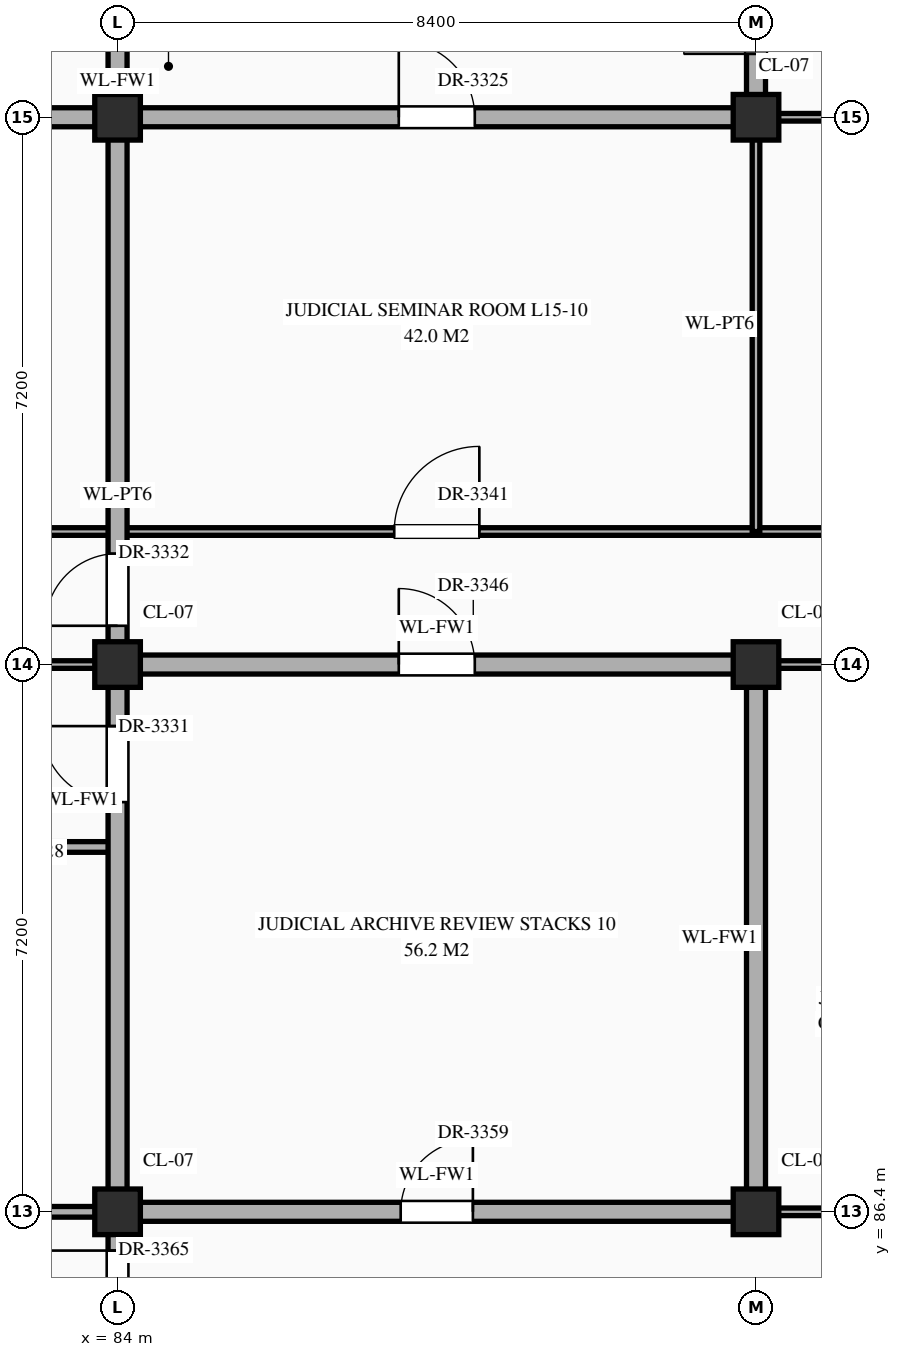
"""IFC4 building model, lengths in metres.
Left out: names, types, materials, properties, quantities, classifications, styles, units other than length and angle.
Written with IfcOpenShell. Run it as: python <this file> out.ifc"""

import sys

from ifc_helpers import new_model, si_unit, direction, frame, frame_2d, origin, origin_2d, place, context, subcontext, project, spatial, rectangle, extrude, element, fill, save


model = new_model("IFC4")
c1 = context("Model", 3, precision=1e-05, world=origin(), true_north=direction((0.0, 1.0)))
c2 = subcontext(c1, "Body", "Model", "MODEL_VIEW")
j1 = project(units=[si_unit("LENGTHUNIT", "METRE"), si_unit("PLANEANGLEUNIT", "RADIAN")], contexts=[c1])
p1 = place(None, origin())
s1 = spatial("IfcSite", under=j1, at=p1, CompositionType="ELEMENT")
p2 = place(p1, origin())
s2 = spatial("IfcBuilding", under=s1, at=p2, CompositionType="ELEMENT")
p3 = place(p2, frame((0.0, 0.0, 64.5)))
s3 = spatial("IfcBuildingStorey", under=s2, at=p3, CompositionType="ELEMENT", Elevation=64.5)
for number, where, z_axis, x_axis in (
    (1, (84.0, 86.4, 0.0), (0.0, 0.0, 1.0), (1.0, 0.0, 0.0)),
    (2, (84.0, 93.6, 0.0), (0.0, 0.0, 1.0), (1.0, 0.0, 0.0)),
    (3, (84.0, 100.8, 0.0), (0.0, 0.0, 1.0), (1.0, 0.0, 0.0)),
    (4, (92.4, 86.4, 0.0), (0.0, 0.0, 1.0), (1.0, 0.0, 0.0)),
    (5, (92.4, 93.6, 0.0), (0.0, 0.0, 1.0), (1.0, 0.0, 0.0)),
    (6, (92.4, 100.8, 0.0), (0.0, 0.0, 1.0), (1.0, 0.0, 0.0)),
):
    element("IfcColumn", number, at=place(p3, frame(where, z_axis=z_axis, x_axis=x_axis)), inside=s3, PredefinedType="COLUMN", context=c2, shape_type="SweptSolid", body=[
        extrude(rectangle(XDim=0.6, YDim=0.6, at=origin_2d()), origin(), (0.0, 0.0, 1.0), 4.2),
    ])
p4 = place(p3, frame((75.6, 86.4, 0.0), z_axis=(0.0, 0.0, 1.0), x_axis=(1.0, 0.0, 0.0)))
e7 = element("IfcWall", 7, at=p4, inside=s3, PredefinedType="STANDARD", context=c2, shape_type="SweptSolid", body=[
    extrude(rectangle(XDim=8.4, YDim=0.14, at=frame_2d((4.2, 0.0))), origin(), (0.0, 0.0, 1.0), 3.0),
])
p5 = place(p3, frame((84.0, 86.4, 0.0), z_axis=(0.0, 0.0, 1.0), x_axis=(1.0, 0.0, 0.0)))
e8 = element("IfcWall", 8, at=p5, inside=s3, PredefinedType="STANDARD", context=c2, shape_type="SweptSolid", body=[
    extrude(rectangle(XDim=8.4, YDim=0.25, at=frame_2d((4.2, 0.0))), origin(), (0.0, 0.0, 1.0), 3.0),
])
p6 = place(p5, frame((3.725, 0.0, 0.0)))
e9 = element("IfcOpeningElement", 9, at=p6, cuts=e8, PredefinedType="OPENING", context=c2, shape_type="SweptSolid", body=[
    extrude(rectangle(XDim=0.95, YDim=2.15, at=frame_2d((0.475, 1.075))), frame((0.0, 0.137, 0.0), z_axis=(0.0, -1.0, 0.0), x_axis=(1.0, 0.0, 0.0)), (0.0, 0.0, 1.0), 0.274),
])
p7 = place(p3, frame((92.4, 86.4, 0.0), z_axis=(0.0, 0.0, 1.0), x_axis=(1.0, 0.0, 0.0)))
e10 = element("IfcWall", 10, at=p7, inside=s3, PredefinedType="STANDARD", context=c2, shape_type="SweptSolid", body=[
    extrude(rectangle(XDim=5.6, YDim=0.1, at=frame_2d((2.8, 0.0))), origin(), (0.0, 0.0, 1.0), 3.0),
])
p8 = place(p7, frame((0.89, 0.0, 0.0)))
e11 = element("IfcOpeningElement", 11, at=p8, cuts=e10, PredefinedType="OPENING", context=c2, shape_type="SweptSolid", body=[
    extrude(rectangle(XDim=1.24, YDim=2.3, at=frame_2d((0.62, 1.15))), frame((0.0, 0.062, 0.0), z_axis=(0.0, -1.0, 0.0), x_axis=(1.0, 0.0, 0.0)), (0.0, 0.0, 1.0), 0.124),
])
p9 = place(p7, frame((3.73, 0.0, 0.0)))
e12 = element("IfcOpeningElement", 12, at=p9, cuts=e10, PredefinedType="OPENING", context=c2, shape_type="SweptSolid", body=[
    extrude(rectangle(XDim=0.94, YDim=2.3, at=frame_2d((0.47, 1.15))), frame((0.0, 0.062, 0.0), z_axis=(0.0, -1.0, 0.0), x_axis=(1.0, 0.0, 0.0)), (0.0, 0.0, 1.0), 0.124),
])
p10 = place(p3, frame((75.6, 91.2, 0.0), z_axis=(0.0, 0.0, 1.0), x_axis=(1.0, 0.0, 0.0)))
e13 = element("IfcWall", 13, at=p10, inside=s3, PredefinedType="STANDARD", context=c2, shape_type="SweptSolid", body=[
    extrude(rectangle(XDim=8.4, YDim=0.14, at=frame_2d((4.2, 0.0))), origin(), (0.0, 0.0, 1.0), 3.95),
])
p11 = place(p10, frame((0.65, 0.0, 0.0)))
e14 = element("IfcOpeningElement", 14, at=p11, cuts=e13, PredefinedType="OPENING", context=c2, shape_type="SweptSolid", body=[
    extrude(rectangle(XDim=0.9, YDim=2.15, at=frame_2d((0.45, 1.075))), frame((0.0, 0.082, 0.0), z_axis=(0.0, -1.0, 0.0), x_axis=(1.0, 0.0, 0.0)), (0.0, 0.0, 1.0), 0.164),
])
p12 = place(p10, frame((3.22, 0.0, 0.0)))
e15 = element("IfcOpeningElement", 15, at=p12, cuts=e13, PredefinedType="OPENING", context=c2, shape_type="SweptSolid", body=[
    extrude(rectangle(XDim=0.86, YDim=2.1, at=frame_2d((0.43, 1.05))), frame((0.0, 0.082, 0.0), z_axis=(0.0, -1.0, 0.0), x_axis=(1.0, 0.0, 0.0)), (0.0, 0.0, 1.0), 0.164),
])
p13 = place(p10, frame((6.32, 0.0, 0.0)))
e16 = element("IfcOpeningElement", 16, at=p13, cuts=e13, PredefinedType="OPENING", context=c2, shape_type="SweptSolid", body=[
    extrude(rectangle(XDim=0.86, YDim=2.1, at=frame_2d((0.43, 1.05))), frame((0.0, 0.082, 0.0), z_axis=(0.0, -1.0, 0.0), x_axis=(1.0, 0.0, 0.0)), (0.0, 0.0, 1.0), 0.164),
])
p14 = place(p3, frame((75.6, 93.6, 0.0), z_axis=(0.0, 0.0, 1.0), x_axis=(1.0, 0.0, 0.0)))
e17 = element("IfcWall", 17, at=p14, inside=s3, PredefinedType="STANDARD", context=c2, shape_type="SweptSolid", body=[
    extrude(rectangle(XDim=8.4, YDim=0.1, at=frame_2d((4.2, 0.0))), origin(), (0.0, 0.0, 1.0), 3.1),
])
p15 = place(p14, frame((3.425, 0.0, 0.0)))
e18 = element("IfcOpeningElement", 18, at=p15, cuts=e17, PredefinedType="OPENING", context=c2, shape_type="SweptSolid", body=[
    extrude(rectangle(XDim=1.55, YDim=2.35, at=frame_2d((0.775, 1.175))), frame((0.0, 0.062, 0.0), z_axis=(0.0, -1.0, 0.0), x_axis=(1.0, 0.0, 0.0)), (0.0, 0.0, 1.0), 0.124),
])
p16 = place(p3, frame((84.0, 93.6, 0.0), z_axis=(0.0, 0.0, 1.0), x_axis=(1.0, 0.0, 0.0)))
e19 = element("IfcWall", 19, at=p16, inside=s3, PredefinedType="STANDARD", context=c2, shape_type="SweptSolid", body=[
    extrude(rectangle(XDim=8.4, YDim=0.25, at=frame_2d((4.2, 0.0))), origin(), (0.0, 0.0, 1.0), 3.1),
])
p17 = place(p16, frame((3.7, 0.0, 0.0)))
e20 = element("IfcOpeningElement", 20, at=p17, cuts=e19, PredefinedType="OPENING", context=c2, shape_type="SweptSolid", body=[
    extrude(rectangle(XDim=1.0, YDim=2.2, at=frame_2d((0.5, 1.1))), frame((0.0, 0.137, 0.0), z_axis=(0.0, -1.0, 0.0), x_axis=(1.0, 0.0, 0.0)), (0.0, 0.0, 1.0), 0.274),
])
p18 = place(p3, frame((92.4, 93.6, 0.0), z_axis=(0.0, 0.0, 1.0), x_axis=(1.0, 0.0, 0.0)))
e21 = element("IfcWall", 21, at=p18, inside=s3, PredefinedType="STANDARD", context=c2, shape_type="SweptSolid", body=[
    extrude(rectangle(XDim=5.6, YDim=0.1, at=frame_2d((2.8, 0.0))), origin(), (0.0, 0.0, 1.0), 3.1),
])
p19 = place(p18, frame((1.02, 0.0, 0.0)))
e22 = element("IfcOpeningElement", 22, at=p19, cuts=e21, PredefinedType="OPENING", context=c2, shape_type="SweptSolid", body=[
    extrude(rectangle(XDim=0.98, YDim=2.35, at=frame_2d((0.49, 1.175))), frame((0.0, 0.062, 0.0), z_axis=(0.0, -1.0, 0.0), x_axis=(1.0, 0.0, 0.0)), (0.0, 0.0, 1.0), 0.124),
])
p20 = place(p18, frame((3.69, 0.0, 0.0)))
e23 = element("IfcOpeningElement", 23, at=p20, cuts=e21, PredefinedType="OPENING", context=c2, shape_type="SweptSolid", body=[
    extrude(rectangle(XDim=1.02, YDim=2.4, at=frame_2d((0.51, 1.2))), frame((0.0, 0.062, 0.0), z_axis=(0.0, -1.0, 0.0), x_axis=(1.0, 0.0, 0.0)), (0.0, 0.0, 1.0), 0.124),
])
p21 = place(p3, frame((58.84, 95.35, 0.0), z_axis=(0.0, 0.0, 1.0), x_axis=(1.0, 0.0, 0.0)))
e24 = element("IfcWall", 24, at=p21, inside=s3, PredefinedType="STANDARD", context=c2, shape_type="SweptSolid", body=[
    extrude(rectangle(XDim=50.32, YDim=0.1, at=frame_2d((25.16, 0.0))), origin(), (0.0, 0.0, 1.0), 3.95),
])
p22 = place(p21, frame((3.61, 0.0, 0.0)))
e25 = element("IfcOpeningElement", 25, at=p22, cuts=e24, PredefinedType="OPENING", context=c2, shape_type="SweptSolid", body=[
    extrude(rectangle(XDim=1.14, YDim=2.4, at=frame_2d((0.57, 1.2))), frame((0.0, 0.062, 0.0), z_axis=(0.0, -1.0, 0.0), x_axis=(1.0, 0.0, 0.0)), (0.0, 0.0, 1.0), 0.124),
])
p23 = place(p21, frame((9.61, 0.0, 0.0)))
e26 = element("IfcOpeningElement", 26, at=p23, cuts=e24, PredefinedType="OPENING", context=c2, shape_type="SweptSolid", body=[
    extrude(rectangle(XDim=0.9, YDim=2.15, at=frame_2d((0.45, 1.075))), frame((0.0, 0.062, 0.0), z_axis=(0.0, -1.0, 0.0), x_axis=(1.0, 0.0, 0.0)), (0.0, 0.0, 1.0), 0.124),
])
p24 = place(p21, frame((12.53, 0.0, 0.0)))
e27 = element("IfcOpeningElement", 27, at=p24, cuts=e24, PredefinedType="OPENING", context=c2, shape_type="SweptSolid", body=[
    extrude(rectangle(XDim=0.86, YDim=2.1, at=frame_2d((0.43, 1.05))), frame((0.0, 0.062, 0.0), z_axis=(0.0, -1.0, 0.0), x_axis=(1.0, 0.0, 0.0)), (0.0, 0.0, 1.0), 0.124),
])
p25 = place(p21, frame((15.0, 0.0, 0.0)))
e28 = element("IfcOpeningElement", 28, at=p25, cuts=e24, PredefinedType="OPENING", context=c2, shape_type="SweptSolid", body=[
    extrude(rectangle(XDim=0.92, YDim=2.15, at=frame_2d((0.46, 1.075))), frame((0.0, 0.062, 0.0), z_axis=(0.0, -1.0, 0.0), x_axis=(1.0, 0.0, 0.0)), (0.0, 0.0, 1.0), 0.124),
])
p26 = place(p21, frame((20.48, 0.0, 0.0)))
e29 = element("IfcOpeningElement", 29, at=p26, cuts=e24, PredefinedType="OPENING", context=c2, shape_type="SweptSolid", body=[
    extrude(rectangle(XDim=0.96, YDim=2.2, at=frame_2d((0.48, 1.1))), frame((0.0, 0.062, 0.0), z_axis=(0.0, -1.0, 0.0), x_axis=(1.0, 0.0, 0.0)), (0.0, 0.0, 1.0), 0.124),
])
p27 = place(p21, frame((28.8, 0.0, 0.0)))
e30 = element("IfcOpeningElement", 30, at=p27, cuts=e24, PredefinedType="OPENING", context=c2, shape_type="SweptSolid", body=[
    extrude(rectangle(XDim=1.12, YDim=2.25, at=frame_2d((0.56, 1.125))), frame((0.0, 0.062, 0.0), z_axis=(0.0, -1.0, 0.0), x_axis=(1.0, 0.0, 0.0)), (0.0, 0.0, 1.0), 0.124),
])
p28 = place(p21, frame((34.68, 0.0, 0.0)))
e31 = element("IfcOpeningElement", 31, at=p28, cuts=e24, PredefinedType="OPENING", context=c2, shape_type="SweptSolid", body=[
    extrude(rectangle(XDim=1.16, YDim=2.3, at=frame_2d((0.58, 1.15))), frame((0.0, 0.062, 0.0), z_axis=(0.0, -1.0, 0.0), x_axis=(1.0, 0.0, 0.0)), (0.0, 0.0, 1.0), 0.124),
])
p29 = place(p21, frame((37.56, 0.0, 0.0)))
e32 = element("IfcOpeningElement", 32, at=p29, cuts=e24, PredefinedType="OPENING", context=c2, shape_type="SweptSolid", body=[
    extrude(rectangle(XDim=1.2, YDim=2.35, at=frame_2d((0.6, 1.175))), frame((0.0, 0.062, 0.0), z_axis=(0.0, -1.0, 0.0), x_axis=(1.0, 0.0, 0.0)), (0.0, 0.0, 1.0), 0.124),
])
p30 = place(p21, frame((40.04, 0.0, 0.0)))
e33 = element("IfcOpeningElement", 33, at=p30, cuts=e24, PredefinedType="OPENING", context=c2, shape_type="SweptSolid", body=[
    extrude(rectangle(XDim=1.24, YDim=2.3, at=frame_2d((0.62, 1.15))), frame((0.0, 0.062, 0.0), z_axis=(0.0, -1.0, 0.0), x_axis=(1.0, 0.0, 0.0)), (0.0, 0.0, 1.0), 0.124),
])
p31 = place(p21, frame((45.5, 0.0, 0.0)))
e34 = element("IfcOpeningElement", 34, at=p31, cuts=e24, PredefinedType="OPENING", context=c2, shape_type="SweptSolid", body=[
    extrude(rectangle(XDim=1.28, YDim=2.35, at=frame_2d((0.64, 1.175))), frame((0.0, 0.062, 0.0), z_axis=(0.0, -1.0, 0.0), x_axis=(1.0, 0.0, 0.0)), (0.0, 0.0, 1.0), 0.124),
])
p32 = place(p3, frame((75.6, 100.8, 0.0), z_axis=(0.0, 0.0, 1.0), x_axis=(1.0, 0.0, 0.0)))
e35 = element("IfcWall", 35, at=p32, inside=s3, PredefinedType="STANDARD", context=c2, shape_type="SweptSolid", body=[
    extrude(rectangle(XDim=16.8, YDim=0.25, at=frame_2d((8.4, 0.0))), origin(), (0.0, 0.0, 1.0), 3.1),
])
p33 = place(p32, frame((3.65, 0.0, 0.0)))
e36 = element("IfcOpeningElement", 36, at=p33, cuts=e35, PredefinedType="OPENING", context=c2, shape_type="SweptSolid", body=[
    extrude(rectangle(XDim=1.1, YDim=2.2, at=frame_2d((0.55, 1.1))), frame((0.0, 0.137, 0.0), z_axis=(0.0, -1.0, 0.0), x_axis=(1.0, 0.0, 0.0)), (0.0, 0.0, 1.0), 0.274),
])
p34 = place(p32, frame((12.1, 0.0, 0.0)))
e37 = element("IfcOpeningElement", 37, at=p34, cuts=e35, PredefinedType="OPENING", context=c2, shape_type="SweptSolid", body=[
    extrude(rectangle(XDim=1.0, YDim=2.2, at=frame_2d((0.5, 1.1))), frame((0.0, 0.137, 0.0), z_axis=(0.0, -1.0, 0.0), x_axis=(1.0, 0.0, 0.0)), (0.0, 0.0, 1.0), 0.274),
])
p35 = place(p3, frame((92.4, 100.8, 0.0), z_axis=(0.0, 0.0, 1.0), x_axis=(1.0, 0.0, 0.0)))
e38 = element("IfcWall", 38, at=p35, inside=s3, PredefinedType="STANDARD", context=c2, shape_type="SweptSolid", body=[
    extrude(rectangle(XDim=3.4, YDim=0.1, at=frame_2d((1.7, 0.0))), origin(), (0.0, 0.0, 1.0), 3.1),
])
p36 = place(p35, frame((1.31, 0.0, 0.0)))
e39 = element("IfcOpeningElement", 39, at=p36, cuts=e38, PredefinedType="OPENING", context=c2, shape_type="SweptSolid", body=[
    extrude(rectangle(XDim=1.0, YDim=2.25, at=frame_2d((0.5, 1.125))), frame((0.0, 0.062, 0.0), z_axis=(0.0, -1.0, 0.0), x_axis=(1.0, 0.0, 0.0)), (0.0, 0.0, 1.0), 0.124),
])
p37 = place(p3, frame((84.0, 79.24, 0.0), z_axis=(0.0, 0.0, 1.0), x_axis=(0.0, 1.0, 0.0)))
e40 = element("IfcWall", 40, at=p37, inside=s3, PredefinedType="STANDARD", context=c2, shape_type="SweptSolid", body=[
    extrude(rectangle(XDim=25.16, YDim=0.25, at=frame_2d((12.58, 0.0))), origin(), (0.0, 0.0, 1.0), 3.1),
])
p38 = place(p37, frame((22.72, 0.0, 0.0)))
e41 = element("IfcOpeningElement", 41, at=p38, cuts=e40, PredefinedType="OPENING", context=c2, shape_type="SweptSolid", body=[
    extrude(rectangle(XDim=1.5, YDim=2.25, at=frame_2d((0.75, 1.125))), frame((0.0, 0.137, 0.0), z_axis=(0.0, -1.0, 0.0), x_axis=(1.0, 0.0, 0.0)), (0.0, 0.0, 1.0), 0.274),
])
p39 = place(p37, frame((12.55, 0.0, 0.0)))
e42 = element("IfcOpeningElement", 42, at=p39, cuts=e40, PredefinedType="OPENING", context=c2, shape_type="SweptSolid", body=[
    extrude(rectangle(XDim=1.0, YDim=2.2, at=frame_2d((0.5, 1.1))), frame((0.0, 0.137, 0.0), z_axis=(0.0, -1.0, 0.0), x_axis=(1.0, 0.0, 0.0)), (0.0, 0.0, 1.0), 0.274),
])
p40 = place(p37, frame((14.87, 0.0, 0.0)))
e43 = element("IfcOpeningElement", 43, at=p40, cuts=e40, PredefinedType="OPENING", context=c2, shape_type="SweptSolid", body=[
    extrude(rectangle(XDim=0.95, YDim=2.15, at=frame_2d((0.475, 1.075))), frame((0.0, 0.137, 0.0), z_axis=(0.0, -1.0, 0.0), x_axis=(1.0, 0.0, 0.0)), (0.0, 0.0, 1.0), 0.274),
])
p41 = place(p37, frame((5.7, 0.0, 0.0)))
e44 = element("IfcOpeningElement", 44, at=p41, cuts=e40, PredefinedType="OPENING", context=c2, shape_type="SweptSolid", body=[
    extrude(rectangle(XDim=0.95, YDim=2.15, at=frame_2d((0.475, 1.075))), frame((0.0, 0.137, 0.0), z_axis=(0.0, -1.0, 0.0), x_axis=(1.0, 0.0, 0.0)), (0.0, 0.0, 1.0), 0.274),
])
p42 = place(p3, frame((92.4, 86.4, 0.0), z_axis=(0.0, 0.0, 1.0), x_axis=(0.0, 1.0, 0.0)))
e45 = element("IfcWall", 45, at=p42, inside=s3, PredefinedType="STANDARD", context=c2, shape_type="SweptSolid", body=[
    extrude(rectangle(XDim=7.2, YDim=0.25, at=frame_2d((3.6, 0.0))), origin(), (0.0, 0.0, 1.0), 3.2),
])
p43 = place(p3, frame((92.4, 95.35, 0.0), z_axis=(0.0, 0.0, 1.0), x_axis=(0.0, 1.0, 0.0)))
e46 = element("IfcWall", 46, at=p43, inside=s3, PredefinedType="STANDARD", context=c2, shape_type="SweptSolid", body=[
    extrude(rectangle(XDim=5.45, YDim=0.1, at=frame_2d((2.725, 0.0))), origin(), (0.0, 0.0, 1.0), 3.2),
])
p44 = place(p3, frame((92.4, 100.8, 0.0), z_axis=(0.0, 0.0, 1.0), x_axis=(0.0, 1.0, 0.0)))
e47 = element("IfcWall", 47, at=p44, inside=s3, PredefinedType="STANDARD", context=c2, shape_type="SweptSolid", body=[
    extrude(rectangle(XDim=3.6, YDim=0.25, at=frame_2d((1.8, 0.0))), origin(), (0.0, 0.0, 1.0), 3.2),
])
p45 = place(p44, frame((0.835, 0.0, 0.0)))
e48 = element("IfcOpeningElement", 48, at=p45, cuts=e47, PredefinedType="OPENING", context=c2, shape_type="SweptSolid", body=[
    extrude(rectangle(XDim=0.95, YDim=2.15, at=frame_2d((0.475, 1.075))), frame((0.0, 0.137, 0.0), z_axis=(0.0, -1.0, 0.0), x_axis=(1.0, 0.0, 0.0)), (0.0, 0.0, 1.0), 0.274),
])
p46 = place(p45, origin())
e49 = element("IfcDoor", 49, at=p46, inside=s3, OperationType="SINGLE_SWING_LEFT", PredefinedType="DOOR", context=c2, shape_type="SweptSolid", body=[
    extrude(rectangle(XDim=0.95, YDim=2.15, at=frame_2d((0.475, 1.075))), frame((0.0, 0.025, 0.0), z_axis=(0.0, -1.0, 0.0), x_axis=(1.0, 0.0, 0.0)), (0.0, 0.0, 1.0), 0.05),
])
fill(e48, e49)
p47 = place(p34, origin())
e50 = element("IfcDoor", 50, at=p47, inside=s3, OperationType="SINGLE_SWING_LEFT", PredefinedType="DOOR", context=c2, shape_type="SweptSolid", body=[
    extrude(rectangle(XDim=1.0, YDim=2.2, at=frame_2d((0.5, 1.1))), frame((0.0, 0.025, 0.0), z_axis=(0.0, -1.0, 0.0), x_axis=(1.0, 0.0, 0.0)), (0.0, 0.0, 1.0), 0.05),
])
fill(e37, e50)
p48 = place(p39, origin())
e51 = element("IfcDoor", 51, at=p48, inside=s3, OperationType="SINGLE_SWING_RIGHT", PredefinedType="DOOR", context=c2, shape_type="SweptSolid", body=[
    extrude(rectangle(XDim=1.0, YDim=2.2, at=frame_2d((0.5, 1.1))), frame((0.0, 0.025, 0.0), z_axis=(0.0, -1.0, 0.0), x_axis=(1.0, 0.0, 0.0)), (0.0, 0.0, 1.0), 0.05),
])
fill(e42, e51)
p49 = place(p40, origin())
e52 = element("IfcDoor", 52, at=p49, inside=s3, OperationType="SINGLE_SWING_LEFT", PredefinedType="DOOR", context=c2, shape_type="SweptSolid", body=[
    extrude(rectangle(XDim=0.95, YDim=2.15, at=frame_2d((0.475, 1.075))), frame((0.0, 0.025, 0.0), z_axis=(0.0, -1.0, 0.0), x_axis=(1.0, 0.0, 0.0)), (0.0, 0.0, 1.0), 0.05),
])
fill(e43, e52)
p50 = place(p27, origin())
e53 = element("IfcDoor", 53, at=p50, inside=s3, OperationType="SINGLE_SWING_RIGHT", PredefinedType="DOOR", context=c2, shape_type="SweptSolid", body=[
    extrude(rectangle(XDim=1.12, YDim=2.25, at=frame_2d((0.56, 1.125))), frame((0.0, 0.025, 0.0), z_axis=(0.0, -1.0, 0.0), x_axis=(1.0, 0.0, 0.0)), (0.0, 0.0, 1.0), 0.05),
])
fill(e30, e53)
p51 = place(p17, origin())
e54 = element("IfcDoor", 54, at=p51, inside=s3, OperationType="SINGLE_SWING_LEFT", PredefinedType="DOOR", context=c2, shape_type="SweptSolid", body=[
    extrude(rectangle(XDim=1.0, YDim=2.2, at=frame_2d((0.5, 1.1))), frame((0.0, 0.025, 0.0), z_axis=(0.0, -1.0, 0.0), x_axis=(1.0, 0.0, 0.0)), (0.0, 0.0, 1.0), 0.05),
])
fill(e20, e54)
p52 = place(p6, origin())
e55 = element("IfcDoor", 55, at=p52, inside=s3, OperationType="SINGLE_SWING_RIGHT", PredefinedType="DOOR", context=c2, shape_type="SweptSolid", body=[
    extrude(rectangle(XDim=0.95, YDim=2.15, at=frame_2d((0.475, 1.075))), frame((0.0, 0.025, 0.0), z_axis=(0.0, -1.0, 0.0), x_axis=(1.0, 0.0, 0.0)), (0.0, 0.0, 1.0), 0.05),
])
fill(e9, e55)
p53 = place(p41, origin())
e56 = element("IfcDoor", 56, at=p53, inside=s3, OperationType="SINGLE_SWING_RIGHT", PredefinedType="DOOR", context=c2, shape_type="SweptSolid", body=[
    extrude(rectangle(XDim=0.95, YDim=2.15, at=frame_2d((0.475, 1.075))), frame((0.0, 0.025, 0.0), z_axis=(0.0, -1.0, 0.0), x_axis=(1.0, 0.0, 0.0)), (0.0, 0.0, 1.0), 0.05),
])
fill(e44, e56)
save(model, sys.argv[1])
